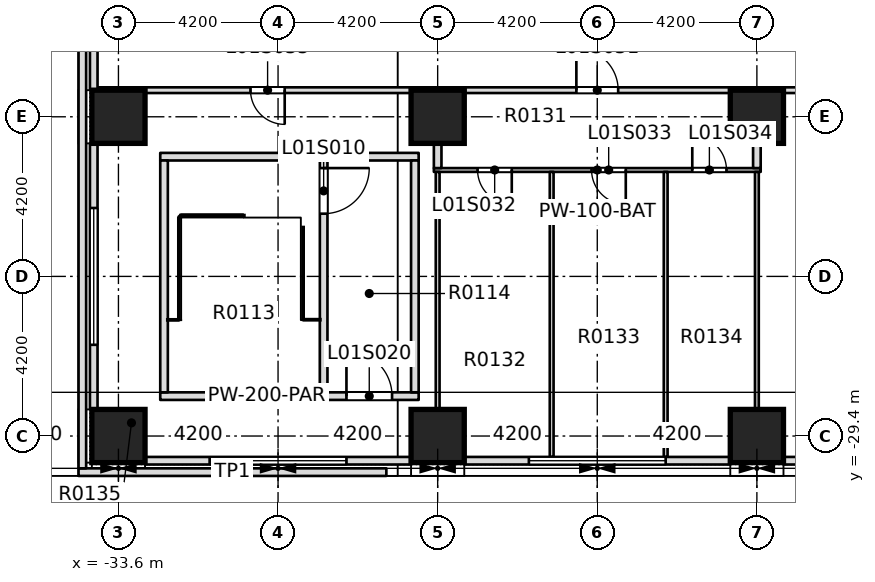
"""IFC4 building model, lengths in metres.
Left out: names, types, materials, properties, quantities, classifications, styles, units other than length and angle.
Written with IfcOpenShell. Run it as: python <this file> out.ifc"""

import sys

from ifc_helpers import new_model, si_unit, direction, frame, frame_2d, origin, origin_2d, place, context, subcontext, project, spatial, rectangle, extrude, element, fill, save


model = new_model("IFC4")
c1 = context("Model", 3, precision=1e-05, world=origin(), true_north=direction((0.0, 1.0)))
c2 = subcontext(c1, "Body", "Model", "MODEL_VIEW")
j1 = project(units=[si_unit("LENGTHUNIT", "METRE"), si_unit("PLANEANGLEUNIT", "RADIAN")], contexts=[c1])
p1 = place(None, origin())
s1 = spatial("IfcSite", under=j1, at=p1, CompositionType="ELEMENT")
p2 = place(p1, origin())
s2 = spatial("IfcBuilding", under=s1, at=p2, CompositionType="ELEMENT")
p3 = place(p2, frame((0.0, 0.0, 7.5)))
s3 = spatial("IfcBuildingStorey", under=s2, at=p3, CompositionType="ELEMENT", Elevation=7.5)
p4 = place(p3, frame((-16.8, -21.0, -0.4), z_axis=(0.0, 0.0, 1.0), x_axis=(1.0, 0.0, 0.0)))
e1 = element("IfcColumn", 1, at=p4, inside=s3, PredefinedType="COLUMN", context=c2, shape_type="SweptSolid", body=[
    extrude(rectangle(XDim=1.4, YDim=1.4, at=origin_2d()), origin(), (0.0, 0.0, 1.0), 5.0),
])
p5 = place(p3, frame((-33.6, -29.4, 0.0), z_axis=(0.0, 0.0, 1.0), x_axis=(1.0, 0.0, 0.0)))
e2 = element("IfcColumn", 2, at=p5, inside=s3, PredefinedType="COLUMN", context=c2, shape_type="SweptSolid", body=[
    extrude(rectangle(XDim=1.4, YDim=1.4, at=origin_2d()), origin(), (0.0, 0.0, 1.0), 4.6),
])
for number, where, z_axis, x_axis in (
    (3, (-25.2, -29.4, 0.0), (0.0, 0.0, 1.0), (1.0, 0.0, 0.0)),
    (4, (-16.8, -29.4, 0.0), (0.0, 0.0, 1.0), (1.0, 0.0, 0.0)),
):
    element("IfcColumn", number, at=place(p3, frame(where, z_axis=z_axis, x_axis=x_axis)), inside=s3, PredefinedType="COLUMN", context=c2, shape_type="SweptSolid", body=[
        extrude(rectangle(XDim=1.4, YDim=1.4, at=origin_2d()), origin(), (0.0, 0.0, 1.0), 5.0),
    ])
p6 = place(p3, frame((-33.6, -21.0, 0.0), z_axis=(0.0, 0.0, 1.0), x_axis=(1.0, 0.0, 0.0)))
e5 = element("IfcColumn", 5, at=p6, inside=s3, PredefinedType="COLUMN", context=c2, shape_type="SweptSolid", body=[
    extrude(rectangle(XDim=1.4, YDim=1.4, at=origin_2d()), origin(), (0.0, 0.0, 1.0), 4.6),
])
p7 = place(p3, frame((-25.2, -21.0, 0.0), z_axis=(0.0, 0.0, 1.0), x_axis=(1.0, 0.0, 0.0)))
e6 = element("IfcColumn", 6, at=p7, inside=s3, PredefinedType="COLUMN", context=c2, shape_type="SweptSolid", body=[
    extrude(rectangle(XDim=1.4, YDim=1.4, at=origin_2d()), origin(), (0.0, 0.0, 1.0), 5.0),
])
p8 = place(p3, frame((-34.65, -30.35, 5.0), z_axis=(0.0, 0.0, 1.0), x_axis=(1.0, 0.0, 0.0)))
e7 = element("IfcWall", 7, at=p8, inside=s3, PredefinedType="PARAPET", context=c2, shape_type="SweptSolid", body=[
    extrude(rectangle(XDim=8.1, YDim=0.2, at=frame_2d((4.05, 0.0))), origin(), (0.0, 0.0, 1.0), 1.2),
])
p9 = place(p3, frame((-34.55, -30.25, 5.0), z_axis=(0.0, 0.0, 1.0), x_axis=(0.0, 1.0, 0.0)))
e8 = element("IfcWall", 8, at=p9, inside=s3, PredefinedType="PARAPET", context=c2, shape_type="SweptSolid", body=[
    extrude(rectangle(XDim=60.5, YDim=0.2, at=frame_2d((30.25, 0.0))), origin(), (0.0, 0.0, 1.0), 1.2),
])
p10 = place(p3, frame((-32.5, -28.35, 0.0), z_axis=(0.0, 0.0, 1.0), x_axis=(1.0, 0.0, 0.0)))
e9 = element("IfcWall", 9, at=p10, inside=s3, PredefinedType="PARTITIONING", context=c2, shape_type="SweptSolid", body=[
    extrude(rectangle(XDim=6.8, YDim=0.2, at=frame_2d((3.4, 0.0))), origin(), (0.0, 0.0, 1.0), 4.6),
])
p11 = place(p10, frame((4.9, 0.0, 0.0)))
e10 = element("IfcOpeningElement", 10, at=p11, cuts=e9, PredefinedType="OPENING", context=c2, shape_type="SweptSolid", body=[
    extrude(rectangle(XDim=1.2, YDim=2.1, at=frame_2d((0.6, 1.05))), frame((0.0, 0.11, 0.0), z_axis=(0.0, -1.0, 0.0), x_axis=(1.0, 0.0, 0.0)), (0.0, 0.0, 1.0), 0.22),
])
p12 = place(p3, frame((-25.3, -22.4, 0.0), z_axis=(0.0, 0.0, 1.0), x_axis=(1.0, 0.0, 0.0)))
e11 = element("IfcWall", 11, at=p12, inside=s3, PredefinedType="PARTITIONING", context=c2, shape_type="SweptSolid", body=[
    extrude(rectangle(XDim=8.6, YDim=0.1, at=frame_2d((4.3, 0.0))), origin(), (0.0, 0.0, 1.0), 4.6),
])
p13 = place(p12, frame((1.15, 0.0, 0.0)))
e12 = element("IfcOpeningElement", 12, at=p13, cuts=e11, PredefinedType="OPENING", context=c2, shape_type="SweptSolid", body=[
    extrude(rectangle(XDim=0.9, YDim=2.1, at=frame_2d((0.45, 1.05))), frame((0.0, 0.06, 0.0), z_axis=(0.0, -1.0, 0.0), x_axis=(1.0, 0.0, 0.0)), (0.0, 0.0, 1.0), 0.12),
])
p14 = place(p12, frame((4.15, 0.0, 0.0)))
e13 = element("IfcOpeningElement", 13, at=p14, cuts=e11, PredefinedType="OPENING", context=c2, shape_type="SweptSolid", body=[
    extrude(rectangle(XDim=0.9, YDim=2.1, at=frame_2d((0.45, 1.05))), frame((0.0, 0.06, 0.0), z_axis=(0.0, -1.0, 0.0), x_axis=(1.0, 0.0, 0.0)), (0.0, 0.0, 1.0), 0.12),
])
p15 = place(p12, frame((6.8, 0.0, 0.0)))
e14 = element("IfcOpeningElement", 14, at=p15, cuts=e11, PredefinedType="OPENING", context=c2, shape_type="SweptSolid", body=[
    extrude(rectangle(XDim=0.9, YDim=2.1, at=frame_2d((0.45, 1.05))), frame((0.0, 0.06, 0.0), z_axis=(0.0, -1.0, 0.0), x_axis=(1.0, 0.0, 0.0)), (0.0, 0.0, 1.0), 0.12),
])
p16 = place(p3, frame((-32.5, -22.05, 0.0), z_axis=(0.0, 0.0, 1.0), x_axis=(1.0, 0.0, 0.0)))
e15 = element("IfcWall", 15, at=p16, inside=s3, PredefinedType="PARTITIONING", context=c2, shape_type="SweptSolid", body=[
    extrude(rectangle(XDim=6.8, YDim=0.2, at=frame_2d((3.4, 0.0))), origin(), (0.0, 0.0, 1.0), 4.6),
])
p17 = place(p3, frame((-34.15, -20.3, 0.0), z_axis=(0.0, 0.0, 1.0), x_axis=(1.0, 0.0, 0.0)))
e16 = element("IfcWall", 16, at=p17, inside=s3, PredefinedType="PARTITIONING", context=c2, shape_type="SweptSolid", body=[
    extrude(rectangle(XDim=67.825, YDim=0.15, at=frame_2d((33.913, 0.0))), origin(), (0.0, 0.0, 1.0), 4.6),
])
p18 = place(p17, frame((12.6, 0.0, 0.0)))
e17 = element("IfcOpeningElement", 17, at=p18, cuts=e16, PredefinedType="OPENING", context=c2, shape_type="SweptSolid", body=[
    extrude(rectangle(XDim=1.1, YDim=2.1, at=frame_2d((0.55, 1.05))), frame((0.0, 0.085, 0.0), z_axis=(0.0, -1.0, 0.0), x_axis=(1.0, 0.0, 0.0)), (0.0, 0.0, 1.0), 0.17),
])
p19 = place(p17, frame((4.025, 0.0, 0.0)))
e18 = element("IfcOpeningElement", 18, at=p19, cuts=e16, PredefinedType="OPENING", context=c2, shape_type="SweptSolid", body=[
    extrude(rectangle(XDim=0.9, YDim=2.1, at=frame_2d((0.45, 1.05))), frame((0.0, 0.085, 0.0), z_axis=(0.0, -1.0, 0.0), x_axis=(1.0, 0.0, 0.0)), (0.0, 0.0, 1.0), 0.17),
])
p20 = place(p17, frame((26.5, 0.0, 0.0)))
e19 = element("IfcOpeningElement", 19, at=p20, cuts=e16, PredefinedType="OPENING", context=c2, shape_type="SweptSolid", body=[
    extrude(rectangle(XDim=0.9, YDim=2.1, at=frame_2d((0.45, 1.05))), frame((0.0, 0.085, 0.0), z_axis=(0.0, -1.0, 0.0), x_axis=(1.0, 0.0, 0.0)), (0.0, 0.0, 1.0), 0.17),
])
p21 = place(p17, frame((40.85, 0.0, 0.0)))
e20 = element("IfcOpeningElement", 20, at=p21, cuts=e16, PredefinedType="OPENING", context=c2, shape_type="SweptSolid", body=[
    extrude(rectangle(XDim=0.9, YDim=2.1, at=frame_2d((0.45, 1.05))), frame((0.0, 0.085, 0.0), z_axis=(0.0, -1.0, 0.0), x_axis=(1.0, 0.0, 0.0)), (0.0, 0.0, 1.0), 0.17),
])
p22 = place(p17, frame((54.6, 0.0, 0.0)))
e21 = element("IfcOpeningElement", 21, at=p22, cuts=e16, PredefinedType="OPENING", context=c2, shape_type="SweptSolid", body=[
    extrude(rectangle(XDim=1.1, YDim=2.1, at=frame_2d((0.55, 1.05))), frame((0.0, 0.085, 0.0), z_axis=(0.0, -1.0, 0.0), x_axis=(1.0, 0.0, 0.0)), (0.0, 0.0, 1.0), 0.17),
])
p23 = place(p17, frame((63.1, 0.0, 0.0)))
e22 = element("IfcOpeningElement", 22, at=p23, cuts=e16, PredefinedType="OPENING", context=c2, shape_type="SweptSolid", body=[
    extrude(rectangle(XDim=0.9, YDim=2.1, at=frame_2d((0.45, 1.05))), frame((0.0, 0.085, 0.0), z_axis=(0.0, -1.0, 0.0), x_axis=(1.0, 0.0, 0.0)), (0.0, 0.0, 1.0), 0.17),
])
p24 = place(p3, frame((-32.4, -28.25, 0.0), z_axis=(0.0, 0.0, 1.0), x_axis=(0.0, 1.0, 0.0)))
e23 = element("IfcWall", 23, at=p24, inside=s3, PredefinedType="PARTITIONING", context=c2, shape_type="SweptSolid", body=[
    extrude(rectangle(XDim=6.1, YDim=0.2, at=frame_2d((3.05, 0.0))), origin(), (0.0, 0.0, 1.0), 4.6),
])
p25 = place(p3, frame((-28.2, -28.25, 0.0), z_axis=(0.0, 0.0, 1.0), x_axis=(0.0, 1.0, 0.0)))
e24 = element("IfcWall", 24, at=p25, inside=s3, PredefinedType="PARTITIONING", context=c2, shape_type="SweptSolid", body=[
    extrude(rectangle(XDim=6.1, YDim=0.2, at=frame_2d((3.05, 0.0))), origin(), (0.0, 0.0, 1.0), 4.6),
])
p26 = place(p25, frame((4.7, 0.0, 0.0)))
e25 = element("IfcOpeningElement", 25, at=p26, cuts=e24, PredefinedType="OPENING", context=c2, shape_type="SweptSolid", body=[
    extrude(rectangle(XDim=1.2, YDim=2.1, at=frame_2d((0.6, 1.05))), frame((0.0, 0.11, 0.0), z_axis=(0.0, -1.0, 0.0), x_axis=(1.0, 0.0, 0.0)), (0.0, 0.0, 1.0), 0.22),
])
p27 = place(p3, frame((-25.8, -28.25, 0.0), z_axis=(0.0, 0.0, 1.0), x_axis=(0.0, 1.0, 0.0)))
e26 = element("IfcWall", 26, at=p27, inside=s3, PredefinedType="PARTITIONING", context=c2, shape_type="SweptSolid", body=[
    extrude(rectangle(XDim=6.1, YDim=0.2, at=frame_2d((3.05, 0.0))), origin(), (0.0, 0.0, 1.0), 4.6),
])
p28 = place(p3, frame((-25.2, -29.95, 0.0), z_axis=(0.0, 0.0, 1.0), x_axis=(0.0, 1.0, 0.0)))
e27 = element("IfcWall", 27, at=p28, inside=s3, PredefinedType="PARTITIONING", context=c2, shape_type="SweptSolid", body=[
    extrude(rectangle(XDim=7.5, YDim=0.1, at=frame_2d((3.75, 0.0))), origin(), (0.0, 0.0, 1.0), 4.6),
])
p29 = place(p3, frame((-25.2, -22.35, 0.0), z_axis=(0.0, 0.0, 1.0), x_axis=(0.0, 1.0, 0.0)))
e28 = element("IfcWall", 28, at=p29, inside=s3, PredefinedType="PARTITIONING", context=c2, shape_type="SweptSolid", body=[
    extrude(rectangle(XDim=1.975, YDim=0.2, at=frame_2d((0.988, 0.0))), origin(), (0.0, 0.0, 1.0), 4.6),
])
for number, where, z_axis, x_axis in (
    (29, (-22.2, -29.95, 0.0), (0.0, 0.0, 1.0), (0.0, 1.0, 0.0)),
    (30, (-19.2, -29.95, 0.0), (0.0, 0.0, 1.0), (0.0, 1.0, 0.0)),
    (31, (-16.8, -29.95, 0.0), (0.0, 0.0, 1.0), (0.0, 1.0, 0.0)),
):
    element("IfcWall", number, at=place(p3, frame(where, z_axis=z_axis, x_axis=x_axis)), inside=s3, PredefinedType="PARTITIONING", context=c2, shape_type="SweptSolid", body=[
        extrude(rectangle(XDim=7.5, YDim=0.1, at=frame_2d((3.75, 0.0))), origin(), (0.0, 0.0, 1.0), 4.6),
    ])
p30 = place(p3, frame((-16.8, -22.35, 0.0), z_axis=(0.0, 0.0, 1.0), x_axis=(0.0, 1.0, 0.0)))
e32 = element("IfcWall", 32, at=p30, inside=s3, PredefinedType="PARTITIONING", context=c2, shape_type="SweptSolid", body=[
    extrude(rectangle(XDim=1.975, YDim=0.2, at=frame_2d((0.988, 0.0))), origin(), (0.0, 0.0, 1.0), 4.6),
])
p31 = place(p3, frame((-32.9, -30.05, 0.0), z_axis=(0.0, 0.0, 1.0), x_axis=(1.0, 0.0, 0.0)))
e33 = element("IfcWall", 33, at=p31, inside=s3, PredefinedType="STANDARD", context=c2, shape_type="SweptSolid", body=[
    extrude(rectangle(XDim=7.0, YDim=0.2, at=frame_2d((3.5, 0.0))), origin(), (0.0, 0.0, 1.0), 4.6),
])
p32 = place(p31, frame((1.7, 0.0, 0.9)))
e34 = element("IfcOpeningElement", 34, at=p32, cuts=e33, PredefinedType="OPENING", context=c2, shape_type="SweptSolid", body=[
    extrude(rectangle(XDim=3.6, YDim=2.8, at=frame_2d((1.8, 1.4))), frame((0.0, 0.11, 0.0), z_axis=(0.0, -1.0, 0.0), x_axis=(1.0, 0.0, 0.0)), (0.0, 0.0, 1.0), 0.22),
])
p33 = place(p3, frame((-24.5, -30.05, 0.0), z_axis=(0.0, 0.0, 1.0), x_axis=(1.0, 0.0, 0.0)))
e35 = element("IfcWall", 35, at=p33, inside=s3, PredefinedType="STANDARD", context=c2, shape_type="SweptSolid", body=[
    extrude(rectangle(XDim=7.0, YDim=0.2, at=frame_2d((3.5, 0.0))), origin(), (0.0, 0.0, 1.0), 4.6),
])
p34 = place(p33, frame((1.7, 0.0, 0.9)))
e36 = element("IfcOpeningElement", 36, at=p34, cuts=e35, PredefinedType="OPENING", context=c2, shape_type="SweptSolid", body=[
    extrude(rectangle(XDim=3.6, YDim=2.8, at=frame_2d((1.8, 1.4))), frame((0.0, 0.11, 0.0), z_axis=(0.0, -1.0, 0.0), x_axis=(1.0, 0.0, 0.0)), (0.0, 0.0, 1.0), 0.22),
])
p35 = place(p3, frame((-16.1, -30.05, 0.0), z_axis=(0.0, 0.0, 1.0), x_axis=(1.0, 0.0, 0.0)))
e37 = element("IfcWall", 37, at=p35, inside=s3, PredefinedType="STANDARD", context=c2, shape_type="SweptSolid", body=[
    extrude(rectangle(XDim=7.0, YDim=0.2, at=frame_2d((3.5, 0.0))), origin(), (0.0, 0.0, 1.0), 4.6),
])
p36 = place(p35, frame((1.7, 0.0, 0.9)))
e38 = element("IfcOpeningElement", 38, at=p36, cuts=e37, PredefinedType="OPENING", context=c2, shape_type="SweptSolid", body=[
    extrude(rectangle(XDim=3.6, YDim=2.8, at=frame_2d((1.8, 1.4))), frame((0.0, 0.11, 0.0), z_axis=(0.0, -1.0, 0.0), x_axis=(1.0, 0.0, 0.0)), (0.0, 0.0, 1.0), 0.22),
])
p37 = place(p3, frame((-34.25, -13.3, 0.0), z_axis=(0.0, 0.0, 1.0), x_axis=(0.0, -1.0, 0.0)))
e39 = element("IfcWall", 39, at=p37, inside=s3, PredefinedType="STANDARD", context=c2, shape_type="SweptSolid", body=[
    extrude(rectangle(XDim=7.0, YDim=0.2, at=frame_2d((3.5, 0.0))), origin(), (0.0, 0.0, 1.0), 4.6),
])
p38 = place(p37, frame((1.12, 0.0, 0.9)))
e40 = element("IfcOpeningElement", 40, at=p38, cuts=e39, PredefinedType="OPENING", context=c2, shape_type="SweptSolid", body=[
    extrude(rectangle(XDim=3.6, YDim=2.8, at=frame_2d((1.8, 1.4))), frame((0.0, 0.11, 0.0), z_axis=(0.0, -1.0, 0.0), x_axis=(1.0, 0.0, 0.0)), (0.0, 0.0, 1.0), 0.22),
])
p39 = place(p3, frame((-34.25, -21.7, 0.0), z_axis=(0.0, 0.0, 1.0), x_axis=(0.0, -1.0, 0.0)))
e41 = element("IfcWall", 41, at=p39, inside=s3, PredefinedType="STANDARD", context=c2, shape_type="SweptSolid", body=[
    extrude(rectangle(XDim=7.0, YDim=0.2, at=frame_2d((3.5, 0.0))), origin(), (0.0, 0.0, 1.0), 4.6),
])
p40 = place(p39, frame((1.7, 0.0, 0.9)))
e42 = element("IfcOpeningElement", 42, at=p40, cuts=e41, PredefinedType="OPENING", context=c2, shape_type="SweptSolid", body=[
    extrude(rectangle(XDim=3.6, YDim=2.8, at=frame_2d((1.8, 1.4))), frame((0.0, 0.11, 0.0), z_axis=(0.0, -1.0, 0.0), x_axis=(1.0, 0.0, 0.0)), (0.0, 0.0, 1.0), 0.22),
])
p41 = place(p26, origin())
e43 = element("IfcDoor", 43, at=p41, inside=s3, OperationType="DOUBLE_DOOR_SINGLE_SWING", PredefinedType="DOOR", context=c2, shape_type="SweptSolid", body=[
    extrude(rectangle(XDim=1.2, YDim=2.1, at=frame_2d((0.6, 1.05))), frame((0.0, 0.025, 0.0), z_axis=(0.0, -1.0, 0.0), x_axis=(1.0, 0.0, 0.0)), (0.0, 0.0, 1.0), 0.05),
])
fill(e25, e43)
p42 = place(p11, origin())
e44 = element("IfcDoor", 44, at=p42, inside=s3, OperationType="SINGLE_SWING_LEFT", PredefinedType="DOOR", context=c2, shape_type="SweptSolid", body=[
    extrude(rectangle(XDim=1.2, YDim=2.1, at=frame_2d((0.6, 1.05))), frame((0.0, 0.025, 0.0), z_axis=(0.0, -1.0, 0.0), x_axis=(1.0, 0.0, 0.0)), (0.0, 0.0, 1.0), 0.05),
])
fill(e10, e44)
p43 = place(p18, origin())
e45 = element("IfcDoor", 45, at=p43, inside=s3, OperationType="SINGLE_SWING_LEFT", PredefinedType="DOOR", context=c2, shape_type="SweptSolid", body=[
    extrude(rectangle(XDim=1.1, YDim=2.1, at=frame_2d((0.55, 1.05))), frame((0.0, 0.025, 0.0), z_axis=(0.0, -1.0, 0.0), x_axis=(1.0, 0.0, 0.0)), (0.0, 0.0, 1.0), 0.05),
])
fill(e17, e45)
p44 = place(p13, origin())
e46 = element("IfcDoor", 46, at=p44, inside=s3, OperationType="SINGLE_SWING_RIGHT", PredefinedType="DOOR", context=c2, shape_type="SweptSolid", body=[
    extrude(rectangle(XDim=0.9, YDim=2.1, at=frame_2d((0.45, 1.05))), frame((0.0, 0.025, 0.0), z_axis=(0.0, -1.0, 0.0), x_axis=(1.0, 0.0, 0.0)), (0.0, 0.0, 1.0), 0.05),
])
fill(e12, e46)
p45 = place(p14, origin())
e47 = element("IfcDoor", 47, at=p45, inside=s3, OperationType="SINGLE_SWING_RIGHT", PredefinedType="DOOR", context=c2, shape_type="SweptSolid", body=[
    extrude(rectangle(XDim=0.9, YDim=2.1, at=frame_2d((0.45, 1.05))), frame((0.0, 0.025, 0.0), z_axis=(0.0, -1.0, 0.0), x_axis=(1.0, 0.0, 0.0)), (0.0, 0.0, 1.0), 0.05),
])
fill(e13, e47)
p46 = place(p15, origin())
e48 = element("IfcDoor", 48, at=p46, inside=s3, OperationType="SINGLE_SWING_RIGHT", PredefinedType="DOOR", context=c2, shape_type="SweptSolid", body=[
    extrude(rectangle(XDim=0.9, YDim=2.1, at=frame_2d((0.45, 1.05))), frame((0.0, 0.025, 0.0), z_axis=(0.0, -1.0, 0.0), x_axis=(1.0, 0.0, 0.0)), (0.0, 0.0, 1.0), 0.05),
])
fill(e14, e48)
p47 = place(p19, origin())
e49 = element("IfcDoor", 49, at=p47, inside=s3, OperationType="SINGLE_SWING_RIGHT", PredefinedType="DOOR", context=c2, shape_type="SweptSolid", body=[
    extrude(rectangle(XDim=0.9, YDim=2.1, at=frame_2d((0.45, 1.05))), frame((0.0, 0.025, 0.0), z_axis=(0.0, -1.0, 0.0), x_axis=(1.0, 0.0, 0.0)), (0.0, 0.0, 1.0), 0.05),
])
fill(e18, e49)
p48 = place(p32, origin())
e50 = element("IfcWindow", 50, at=p48, inside=s3, PartitioningType="SINGLE_PANEL", PredefinedType="WINDOW", context=c2, shape_type="SweptSolid", body=[
    extrude(rectangle(XDim=3.6, YDim=2.8, at=frame_2d((1.8, 1.4))), frame((0.0, 0.03, 0.0), z_axis=(0.0, -1.0, 0.0), x_axis=(1.0, 0.0, 0.0)), (0.0, 0.0, 1.0), 0.06),
])
fill(e34, e50)
p49 = place(p34, origin())
e51 = element("IfcWindow", 51, at=p49, inside=s3, PartitioningType="SINGLE_PANEL", PredefinedType="WINDOW", context=c2, shape_type="SweptSolid", body=[
    extrude(rectangle(XDim=3.6, YDim=2.8, at=frame_2d((1.8, 1.4))), frame((0.0, 0.03, 0.0), z_axis=(0.0, -1.0, 0.0), x_axis=(1.0, 0.0, 0.0)), (0.0, 0.0, 1.0), 0.06),
])
fill(e36, e51)
p50 = place(p40, origin())
e52 = element("IfcWindow", 52, at=p50, inside=s3, PartitioningType="SINGLE_PANEL", PredefinedType="WINDOW", context=c2, shape_type="SweptSolid", body=[
    extrude(rectangle(XDim=3.6, YDim=2.8, at=frame_2d((1.8, 1.4))), frame((0.0, 0.03, 0.0), z_axis=(0.0, -1.0, 0.0), x_axis=(1.0, 0.0, 0.0)), (0.0, 0.0, 1.0), 0.06),
])
fill(e42, e52)
save(model, sys.argv[1])
